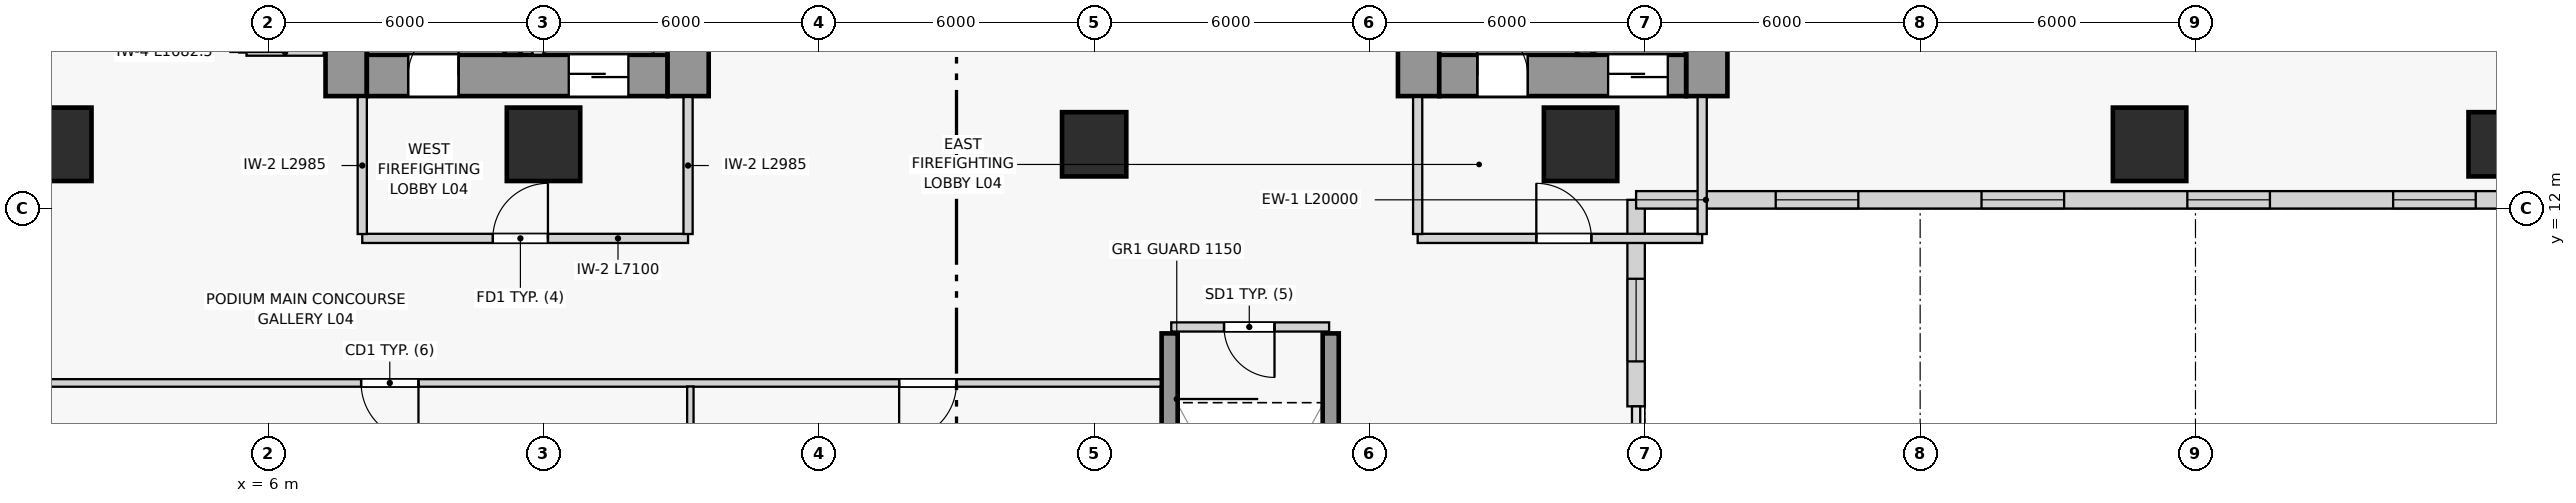
"""IFC4 building model, lengths in metres.
Left out: names, types, materials, properties, quantities, classifications, styles, units other than length and angle.
Written with IfcOpenShell. Run it as: python <this file> out.ifc"""

import sys

from ifc_helpers import new_model, si_unit, direction, frame, frame_2d, origin, origin_2d, place, context, subcontext, project, spatial, rectangle, extrude, source, transform, mapped, element, fill, save


model = new_model("IFC4")
c1 = context("Model", 3, precision=1e-05, world=origin(), true_north=direction((0.0, 1.0)))
c2 = subcontext(c1, "Body", "Model", "MODEL_VIEW")
j1 = project(units=[si_unit("LENGTHUNIT", "METRE"), si_unit("PLANEANGLEUNIT", "RADIAN")], contexts=[c1])
p1 = place(None, origin())
s1 = spatial("IfcSite", under=j1, at=p1, CompositionType="ELEMENT")
p2 = place(p1, origin())
s2 = spatial("IfcBuilding", under=s1, at=p2, CompositionType="ELEMENT")
p3 = place(p2, frame((0.0, 0.0, 18.0)))
s3 = spatial("IfcBuildingStorey", under=s2, at=p3, CompositionType="ELEMENT", Elevation=18.0)
p4 = place(p3, frame((7.7, 14.45, 0.0), z_axis=(0.0, 0.0, 1.0), x_axis=(0.0, 1.0, 0.0)))
e1 = element("IfcWall", 1, at=p4, inside=s3, PredefinedType="SHEAR", context=c2, shape_type="SweptSolid", body=[
    extrude(rectangle(XDim=13.15, YDim=0.9, at=frame_2d((6.575, 0.0))), origin(), (0.0, 0.0, 1.0), 4.5),
])
p5 = place(p3, frame((15.15, 14.45, 0.0), z_axis=(0.0, 0.0, 1.0), x_axis=(0.0, 1.0, 0.0)))
e2 = element("IfcWall", 2, at=p5, inside=s3, PredefinedType="SHEAR", context=c2, shape_type="SweptSolid", body=[
    extrude(rectangle(XDim=13.15, YDim=0.9, at=frame_2d((6.575, 0.0))), origin(), (0.0, 0.0, 1.0), 4.5),
])
p6 = place(p5, frame((5.65, 0.0, 0.0)))
e3 = element("IfcOpeningElement", 3, at=p6, cuts=e2, PredefinedType="OPENING", context=c2, shape_type="SweptSolid", body=[
    extrude(rectangle(XDim=1.1, YDim=2.2, at=frame_2d((0.55, 1.1))), frame((0.0, 0.46, 0.0), z_axis=(0.0, -1.0, 0.0), x_axis=(1.0, 0.0, 0.0)), (0.0, 0.0, 1.0), 0.92),
])
p7 = place(p3, frame((8.15, 14.9, 0.0), z_axis=(0.0, 0.0, 1.0), x_axis=(1.0, 0.0, 0.0)))
e4 = element("IfcWall", 4, at=p7, inside=s3, PredefinedType="SHEAR", context=c2, shape_type="SweptSolid", body=[
    extrude(rectangle(XDim=6.55, YDim=0.9, at=frame_2d((3.275, 0.0))), origin(), (0.0, 0.0, 1.0), 4.5),
])
p8 = place(p7, frame((0.9, 0.0, 0.0)))
e5 = element("IfcOpeningElement", 5, at=p8, cuts=e4, PredefinedType="OPENING", context=c2, shape_type="SweptSolid", body=[
    extrude(rectangle(XDim=1.1, YDim=2.2, at=frame_2d((0.55, 1.1))), frame((0.0, 0.46, 0.0), z_axis=(0.0, -1.0, 0.0), x_axis=(1.0, 0.0, 0.0)), (0.0, 0.0, 1.0), 0.92),
])
p9 = place(p7, frame((4.4, 0.0, 0.0)))
e6 = element("IfcOpeningElement", 6, at=p9, cuts=e4, PredefinedType="OPENING", context=c2, shape_type="SweptSolid", body=[
    extrude(rectangle(XDim=1.3, YDim=2.2, at=frame_2d((0.65, 1.1))), frame((0.0, 0.46, 0.0), z_axis=(0.0, -1.0, 0.0), x_axis=(1.0, 0.0, 0.0)), (0.0, 0.0, 1.0), 0.92),
])
p10 = place(p3, frame((31.07, 14.45, 0.0), z_axis=(0.0, 0.0, 1.0), x_axis=(0.0, 1.0, 0.0)))
e7 = element("IfcWall", 7, at=p10, inside=s3, PredefinedType="SHEAR", context=c2, shape_type="SweptSolid", body=[
    extrude(rectangle(XDim=13.15, YDim=0.9, at=frame_2d((6.575, 0.0))), origin(), (0.0, 0.0, 1.0), 4.5),
])
p11 = place(p3, frame((37.35, 14.45, 0.0), z_axis=(0.0, 0.0, 1.0), x_axis=(0.0, 1.0, 0.0)))
e8 = element("IfcWall", 8, at=p11, inside=s3, PredefinedType="SHEAR", context=c2, shape_type="SweptSolid", body=[
    extrude(rectangle(XDim=13.15, YDim=0.9, at=frame_2d((6.575, 0.0))), origin(), (0.0, 0.0, 1.0), 4.5),
])
p12 = place(p11, frame((5.65, 0.0, 0.0)))
e9 = element("IfcOpeningElement", 9, at=p12, cuts=e8, PredefinedType="OPENING", context=c2, shape_type="SweptSolid", body=[
    extrude(rectangle(XDim=1.1, YDim=2.2, at=frame_2d((0.55, 1.1))), frame((0.0, 0.46, 0.0), z_axis=(0.0, -1.0, 0.0), x_axis=(1.0, 0.0, 0.0)), (0.0, 0.0, 1.0), 0.92),
])
p13 = place(p3, frame((31.52, 14.9, 0.0), z_axis=(0.0, 0.0, 1.0), x_axis=(1.0, 0.0, 0.0)))
e10 = element("IfcWall", 10, at=p13, inside=s3, PredefinedType="SHEAR", context=c2, shape_type="SweptSolid", body=[
    extrude(rectangle(XDim=5.38, YDim=0.9, at=frame_2d((2.69, 0.0))), origin(), (0.0, 0.0, 1.0), 4.5),
])
p14 = place(p13, frame((0.83, 0.0, 0.0)))
e11 = element("IfcOpeningElement", 11, at=p14, cuts=e10, PredefinedType="OPENING", context=c2, shape_type="SweptSolid", body=[
    extrude(rectangle(XDim=1.1, YDim=2.2, at=frame_2d((0.55, 1.1))), frame((0.0, 0.46, 0.0), z_axis=(0.0, -1.0, 0.0), x_axis=(1.0, 0.0, 0.0)), (0.0, 0.0, 1.0), 0.92),
])
p15 = place(p13, frame((3.68, 0.0, 0.0)))
e12 = element("IfcOpeningElement", 12, at=p15, cuts=e10, PredefinedType="OPENING", context=c2, shape_type="SweptSolid", body=[
    extrude(rectangle(XDim=1.3, YDim=2.2, at=frame_2d((0.65, 1.1))), frame((0.0, 0.46, 0.0), z_axis=(0.0, -1.0, 0.0), x_axis=(1.0, 0.0, 0.0)), (0.0, 0.0, 1.0), 0.92),
])
for number, where, z_axis, x_axis in (
    (13, (11.325, 15.35, 0.0), (0.0, 0.0, 1.0), (0.0, 1.0, 0.0)),
    (14, (34.695, 15.35, 0.0), (0.0, 0.0, 1.0), (0.0, 1.0, 0.0)),
):
    element("IfcWall", number, at=place(p3, frame(where, z_axis=z_axis, x_axis=x_axis)), inside=s3, PredefinedType="SHEAR", context=c2, shape_type="SweptSolid", body=[
        extrude(rectangle(XDim=7.75, YDim=0.35, at=frame_2d((3.875, 0.0))), origin(), (0.0, 0.0, 1.0), 4.5),
    ])
for number, where, z_axis, x_axis in (
    (15, (25.645, 1.57, 0.0), (0.0, 0.0, 1.0), (0.0, 1.0, 0.0)),
    (16, (29.155, 1.57, 0.0), (0.0, 0.0, 1.0), (0.0, 1.0, 0.0)),
):
    element("IfcWall", number, at=place(p3, frame(where, z_axis=z_axis, x_axis=x_axis)), inside=s3, PredefinedType="SHEAR", context=c2, shape_type="SweptSolid", body=[
        extrude(rectangle(XDim=7.71, YDim=0.35, at=frame_2d((3.855, 0.0))), origin(), (0.0, 0.0, 1.0), 4.5),
    ])
m1 = source(origin(), c2, "Body", "SweptSolid", [
    extrude(rectangle(XDim=1.6, YDim=1.6, at=origin_2d()), origin(), (0.0, 0.0, 1.0), 4.5),
])
for number, where, z_axis, x_axis in (
    (17, (1.35, 13.4, 0.0), (0.0, 0.0, 1.0), (1.0, 0.0, 0.0)),
    (18, (12.0, 13.4, 0.0), (0.0, 0.0, 1.0), (1.0, 0.0, 0.0)),
):
    element("IfcColumn", number, at=place(p3, frame(where, z_axis=z_axis, x_axis=x_axis)), inside=s3, PredefinedType="COLUMN", context=c2, shape_type="MappedRepresentation", body=[
        mapped(m1, transform((0.0, 0.0, 0.0), scale=1.0)),
    ])
m2 = source(origin(), c2, "Body", "SweptSolid", [
    extrude(rectangle(XDim=1.4, YDim=1.4, at=origin_2d()), origin(), (0.0, 0.0, 1.0), 4.5),
])
p16 = place(p3, frame((24.0, 13.4, 0.0), z_axis=(0.0, 0.0, 1.0), x_axis=(1.0, 0.0, 0.0)))
e19 = element("IfcColumn", 19, at=p16, inside=s3, PredefinedType="COLUMN", context=c2, shape_type="MappedRepresentation", body=[
    mapped(m2, transform((0.0, 0.0, 0.0), scale=1.0)),
])
for number, where, z_axis, x_axis in (
    (20, (34.6, 13.4, 0.0), (0.0, 0.0, 1.0), (1.0, 0.0, 0.0)),
    (21, (47.0, 13.4, 0.0), (0.0, 0.0, 1.0), (1.0, 0.0, 0.0)),
):
    element("IfcColumn", number, at=place(p3, frame(where, z_axis=z_axis, x_axis=x_axis)), inside=s3, PredefinedType="COLUMN", context=c2, shape_type="MappedRepresentation", body=[
        mapped(m1, transform((0.0, 0.0, 0.0), scale=1.0)),
    ])
p17 = place(p3, frame((54.65, 13.4, 0.0), z_axis=(0.0, 0.0, 1.0), x_axis=(1.0, 0.0, 0.0)))
e22 = element("IfcColumn", 22, at=p17, inside=s3, PredefinedType="COLUMN", context=c2, shape_type="MappedRepresentation", body=[
    mapped(m2, transform((0.0, 0.0, 0.0), scale=1.0)),
])
p18 = place(p3, frame((35.81, 7.69, 0.0), z_axis=(0.0, 0.0, 1.0), x_axis=(0.0, 1.0, 0.0)))
e23 = element("IfcWall", 23, at=p18, inside=s3, PredefinedType="SOLIDWALL", context=c2, shape_type="SweptSolid", body=[
    extrude(rectangle(XDim=4.5, YDim=0.38, at=frame_2d((2.25, 0.0))), origin(), (0.0, 0.0, 1.0), 3.85),
])
p19 = place(p18, frame((0.98, 0.0, 0.8)))
e24 = element("IfcOpeningElement", 24, at=p19, cuts=e23, PredefinedType="OPENING", context=c2, shape_type="SweptSolid", body=[
    extrude(rectangle(XDim=1.8, YDim=2.1, at=frame_2d((0.9, 1.05))), frame((0.0, 0.2, 0.0), z_axis=(0.0, -1.0, 0.0), x_axis=(1.0, 0.0, 0.0)), (0.0, 0.0, 1.0), 0.4),
])
p20 = place(p3, frame((35.81, 12.19, 0.0), z_axis=(0.0, 0.0, 1.0), x_axis=(1.0, 0.0, 0.0)))
e25 = element("IfcWall", 25, at=p20, inside=s3, PredefinedType="SOLIDWALL", context=c2, shape_type="SweptSolid", body=[
    extrude(rectangle(XDim=20.0, YDim=0.38, at=frame_2d((10.0, 0.0))), origin(), (0.0, 0.0, 1.0), 3.85),
])
p21 = place(p20, frame((3.042, 0.0, 0.8)))
e26 = element("IfcOpeningElement", 26, at=p21, cuts=e25, PredefinedType="OPENING", context=c2, shape_type="SweptSolid", body=[
    extrude(rectangle(XDim=1.8, YDim=2.1, at=frame_2d((0.9, 1.05))), frame((0.0, 0.2, 0.0), z_axis=(0.0, -1.0, 0.0), x_axis=(1.0, 0.0, 0.0)), (0.0, 0.0, 1.0), 0.4),
])
p22 = place(p20, frame((7.528, 0.0, 0.8)))
e27 = element("IfcOpeningElement", 27, at=p22, cuts=e25, PredefinedType="OPENING", context=c2, shape_type="SweptSolid", body=[
    extrude(rectangle(XDim=1.8, YDim=2.1, at=frame_2d((0.9, 1.05))), frame((0.0, 0.2, 0.0), z_axis=(0.0, -1.0, 0.0), x_axis=(1.0, 0.0, 0.0)), (0.0, 0.0, 1.0), 0.4),
])
p23 = place(p20, frame((12.012, 0.0, 0.8)))
e28 = element("IfcOpeningElement", 28, at=p23, cuts=e25, PredefinedType="OPENING", context=c2, shape_type="SweptSolid", body=[
    extrude(rectangle(XDim=1.8, YDim=2.1, at=frame_2d((0.9, 1.05))), frame((0.0, 0.2, 0.0), z_axis=(0.0, -1.0, 0.0), x_axis=(1.0, 0.0, 0.0)), (0.0, 0.0, 1.0), 0.4),
])
p24 = place(p20, frame((16.498, 0.0, 0.8)))
e29 = element("IfcOpeningElement", 29, at=p24, cuts=e25, PredefinedType="OPENING", context=c2, shape_type="SweptSolid", body=[
    extrude(rectangle(XDim=1.8, YDim=2.1, at=frame_2d((0.9, 1.05))), frame((0.0, 0.2, 0.0), z_axis=(0.0, -1.0, 0.0), x_axis=(1.0, 0.0, 0.0)), (0.0, 0.0, 1.0), 0.4),
])
p25 = place(p3, frame((11.88, 15.35, 0.0), z_axis=(0.0, 0.0, 1.0), x_axis=(0.0, 1.0, 0.0)))
e30 = element("IfcWall", 30, at=p25, inside=s3, PredefinedType="PARTITIONING", context=c2, shape_type="SweptSolid", body=[
    extrude(rectangle(XDim=2.85, YDim=0.24, at=frame_2d((1.425, 0.0))), origin(), (0.0, 0.0, 1.0), 3.85),
])
p26 = place(p3, frame((8.05, 11.35, 0.0), z_axis=(0.0, 0.0, 1.0), x_axis=(1.0, 0.0, 0.0)))
e31 = element("IfcWall", 31, at=p26, inside=s3, PredefinedType="PARTITIONING", context=c2, shape_type="SweptSolid", body=[
    extrude(rectangle(XDim=7.1, YDim=0.2, at=frame_2d((3.55, 0.0))), origin(), (0.0, 0.0, 1.0), 3.85),
])
p27 = place(p26, frame((2.846, 0.0, 0.0)))
e32 = element("IfcOpeningElement", 32, at=p27, cuts=e31, PredefinedType="OPENING", context=c2, shape_type="SweptSolid", body=[
    extrude(rectangle(XDim=1.2, YDim=2.2, at=frame_2d((0.6, 1.1))), frame((0.0, 0.11, 0.0), z_axis=(0.0, -1.0, 0.0), x_axis=(1.0, 0.0, 0.0)), (0.0, 0.0, 1.0), 0.22),
])
for number, where, z_axis, x_axis in (
    (33, (8.05, 11.445, 0.0), (0.0, 0.0, 1.0), (0.0, 1.0, 0.0)),
    (34, (15.15, 11.445, 0.0), (0.0, 0.0, 1.0), (0.0, 1.0, 0.0)),
):
    element("IfcWall", number, at=place(p3, frame(where, z_axis=z_axis, x_axis=x_axis)), inside=s3, PredefinedType="PARTITIONING", context=c2, shape_type="SweptSolid", body=[
        extrude(rectangle(XDim=2.985, YDim=0.2, at=frame_2d((1.492, 0.0))), origin(), (0.0, 0.0, 1.0), 3.85),
    ])
p28 = place(p3, frame((31.05, 11.35, 0.0), z_axis=(0.0, 0.0, 1.0), x_axis=(1.0, 0.0, 0.0)))
e35 = element("IfcWall", 35, at=p28, inside=s3, PredefinedType="PARTITIONING", context=c2, shape_type="SweptSolid", body=[
    extrude(rectangle(XDim=6.2, YDim=0.2, at=frame_2d((3.1, 0.0))), origin(), (0.0, 0.0, 1.0), 3.85),
])
p29 = place(p28, frame((2.586, 0.0, 0.0)))
e36 = element("IfcOpeningElement", 36, at=p29, cuts=e35, PredefinedType="OPENING", context=c2, shape_type="SweptSolid", body=[
    extrude(rectangle(XDim=1.2, YDim=2.2, at=frame_2d((0.6, 1.1))), frame((0.0, 0.11, 0.0), z_axis=(0.0, -1.0, 0.0), x_axis=(1.0, 0.0, 0.0)), (0.0, 0.0, 1.0), 0.22),
])
p30 = place(p3, frame((31.05, 11.445, 0.0), z_axis=(0.0, 0.0, 1.0), x_axis=(0.0, 1.0, 0.0)))
e37 = element("IfcWall", 37, at=p30, inside=s3, PredefinedType="PARTITIONING", context=c2, shape_type="SweptSolid", body=[
    extrude(rectangle(XDim=2.985, YDim=0.2, at=frame_2d((1.492, 0.0))), origin(), (0.0, 0.0, 1.0), 2.72),
])
p31 = place(p3, frame((37.25, 11.445, 0.0), z_axis=(0.0, 0.0, 1.0), x_axis=(0.0, 1.0, 0.0)))
e38 = element("IfcWall", 38, at=p31, inside=s3, PredefinedType="PARTITIONING", context=c2, shape_type="SweptSolid", body=[
    extrude(rectangle(XDim=2.985, YDim=0.2, at=frame_2d((1.492, 0.0))), origin(), (0.0, 0.0, 1.0), 3.85),
])
p32 = place(p3, frame((5.45, 15.4, 0.0), z_axis=(0.0, 0.0, 1.0), x_axis=(0.0, 1.0, 0.0)))
e39 = element("IfcWall", 39, at=p32, inside=s3, PredefinedType="PARTITIONING", context=c2, shape_type="SweptSolid", body=[
    extrude(rectangle(XDim=10.8, YDim=0.165, at=frame_2d((5.4, 0.0))), origin(), (0.0, 0.0, 1.0), 3.85),
])
p33 = place(p32, frame((4.95, 0.0, 0.0)))
e40 = element("IfcOpeningElement", 40, at=p33, cuts=e39, PredefinedType="OPENING", context=c2, shape_type="SweptSolid", body=[
    extrude(rectangle(XDim=0.9, YDim=2.1, at=frame_2d((0.45, 1.05))), frame((0.0, 0.093, 0.0), z_axis=(0.0, -1.0, 0.0), x_axis=(1.0, 0.0, 0.0)), (0.0, 0.0, 1.0), 0.185),
])
p34 = place(p3, frame((5.528, 15.4, 0.0), z_axis=(0.0, 0.0, 1.0), x_axis=(1.0, 0.0, 0.0)))
e41 = element("IfcWall", 41, at=p34, inside=s3, PredefinedType="PARTITIONING", context=c2, shape_type="SweptSolid", body=[
    extrude(rectangle(XDim=1.682, YDim=0.14, at=frame_2d((0.841, 0.0))), origin(), (0.0, 0.0, 1.0), 3.85),
])
p35 = place(p3, frame((25.68, 9.42, 0.0), z_axis=(0.0, 0.0, 1.0), x_axis=(1.0, 0.0, 0.0)))
e42 = element("IfcWall", 42, at=p35, inside=s3, PredefinedType="PARTITIONING", context=c2, shape_type="SweptSolid", body=[
    extrude(rectangle(XDim=3.44, YDim=0.2, at=frame_2d((1.72, 0.0))), origin(), (0.0, 0.0, 1.0), 3.85),
])
p36 = place(p35, frame((1.15, 0.0, 0.0)))
e43 = element("IfcOpeningElement", 43, at=p36, cuts=e42, PredefinedType="OPENING", context=c2, shape_type="SweptSolid", body=[
    extrude(rectangle(XDim=1.1, YDim=2.2, at=frame_2d((0.55, 1.1))), frame((0.0, 0.11, 0.0), z_axis=(0.0, -1.0, 0.0), x_axis=(1.0, 0.0, 0.0)), (0.0, 0.0, 1.0), 0.22),
])
p37 = place(p3, frame((0.185, 8.2, 0.0), z_axis=(0.0, 0.0, 1.0), x_axis=(1.0, 0.0, 0.0)))
e44 = element("IfcWall", 44, at=p37, inside=s3, PredefinedType="PARTITIONING", context=c2, shape_type="SweptSolid", body=[
    extrude(rectangle(XDim=25.265, YDim=0.165, at=frame_2d((12.632, 0.0))), origin(), (0.0, 0.0, 1.0), 3.85),
])
p38 = place(p37, frame((7.84, 0.0, 0.0)))
e45 = element("IfcOpeningElement", 45, at=p38, cuts=e44, PredefinedType="OPENING", context=c2, shape_type="SweptSolid", body=[
    extrude(rectangle(XDim=1.25, YDim=2.2, at=frame_2d((0.625, 1.1))), frame((0.0, 0.093, 0.0), z_axis=(0.0, -1.0, 0.0), x_axis=(1.0, 0.0, 0.0)), (0.0, 0.0, 1.0), 0.185),
])
p39 = place(p37, frame((19.565, 0.0, 0.0)))
e46 = element("IfcOpeningElement", 46, at=p39, cuts=e44, PredefinedType="OPENING", context=c2, shape_type="SweptSolid", body=[
    extrude(rectangle(XDim=1.25, YDim=2.2, at=frame_2d((0.625, 1.1))), frame((0.0, 0.093, 0.0), z_axis=(0.0, -1.0, 0.0), x_axis=(1.0, 0.0, 0.0)), (0.0, 0.0, 1.0), 0.185),
])
p40 = place(p3, frame((15.2, -5.815, 0.0), z_axis=(0.0, 0.0, 1.0), x_axis=(0.0, 1.0, 0.0)))
e47 = element("IfcWall", 47, at=p40, inside=s3, PredefinedType="PARTITIONING", context=c2, shape_type="SweptSolid", body=[
    extrude(rectangle(XDim=13.938, YDim=0.14, at=frame_2d((6.969, 0.0))), origin(), (0.0, 0.0, 1.0), 3.85),
])
m3 = source(origin(), c2, "Body", "SweptSolid", [
    extrude(rectangle(XDim=1.8, YDim=2.1, at=frame_2d((0.9, 1.05))), frame((0.0, 0.03, 0.0), z_axis=(0.0, -1.0, 0.0), x_axis=(1.0, 0.0, 0.0)), (0.0, 0.0, 1.0), 0.06),
])
p41 = place(p19, origin())
e48 = element("IfcWindow", 48, at=p41, inside=s3, PartitioningType="SINGLE_PANEL", PredefinedType="WINDOW", context=c2, shape_type="MappedRepresentation", body=[
    mapped(m3, transform((0.0, 0.0, 0.0), scale=1.0)),
])
fill(e24, e48)
p42 = place(p21, origin())
e49 = element("IfcWindow", 49, at=p42, inside=s3, PartitioningType="SINGLE_PANEL", PredefinedType="WINDOW", context=c2, shape_type="MappedRepresentation", body=[
    mapped(m3, transform((0.0, 0.0, 0.0), scale=1.0)),
])
fill(e26, e49)
p43 = place(p22, origin())
e50 = element("IfcWindow", 50, at=p43, inside=s3, PartitioningType="SINGLE_PANEL", PredefinedType="WINDOW", context=c2, shape_type="MappedRepresentation", body=[
    mapped(m3, transform((0.0, 0.0, 0.0), scale=1.0)),
])
fill(e27, e50)
p44 = place(p23, origin())
e51 = element("IfcWindow", 51, at=p44, inside=s3, PartitioningType="SINGLE_PANEL", PredefinedType="WINDOW", context=c2, shape_type="MappedRepresentation", body=[
    mapped(m3, transform((0.0, 0.0, 0.0), scale=1.0)),
])
fill(e28, e51)
p45 = place(p24, origin())
e52 = element("IfcWindow", 52, at=p45, inside=s3, PartitioningType="SINGLE_PANEL", PredefinedType="WINDOW", context=c2, shape_type="MappedRepresentation", body=[
    mapped(m3, transform((0.0, 0.0, 0.0), scale=1.0)),
])
fill(e29, e52)
m4 = source(origin(), c2, "Body", "SweptSolid", [
    extrude(rectangle(XDim=1.1, YDim=2.2, at=frame_2d((0.55, 1.1))), frame((0.0, 0.025, 0.0), z_axis=(0.0, -1.0, 0.0), x_axis=(1.0, 0.0, 0.0)), (0.0, 0.0, 1.0), 0.05),
])
p46 = place(p8, origin())
e53 = element("IfcDoor", 53, at=p46, inside=s3, OperationType="SINGLE_SWING_RIGHT", PredefinedType="DOOR", context=c2, shape_type="MappedRepresentation", body=[
    mapped(m4, transform((0.0, 0.0, 0.0), scale=1.0)),
])
fill(e5, e53)
p47 = place(p14, origin())
e54 = element("IfcDoor", 54, at=p47, inside=s3, OperationType="SINGLE_SWING_LEFT", PredefinedType="DOOR", context=c2, shape_type="MappedRepresentation", body=[
    mapped(m4, transform((0.0, 0.0, 0.0), scale=1.0)),
])
fill(e11, e54)
m5 = source(origin(), c2, "Body", "SweptSolid", [
    extrude(rectangle(XDim=1.3, YDim=2.2, at=frame_2d((0.65, 1.1))), frame((0.0, 0.025, 0.0), z_axis=(0.0, -1.0, 0.0), x_axis=(1.0, 0.0, 0.0)), (0.0, 0.0, 1.0), 0.05),
])
p48 = place(p9, origin())
e55 = element("IfcDoor", 55, at=p48, inside=s3, OperationType="SLIDING_TO_RIGHT", PredefinedType="DOOR", context=c2, shape_type="MappedRepresentation", body=[
    mapped(m5, transform((0.0, 0.0, 0.0), scale=1.0)),
])
fill(e6, e55)
p49 = place(p15, origin())
e56 = element("IfcDoor", 56, at=p49, inside=s3, OperationType="SLIDING_TO_RIGHT", PredefinedType="DOOR", context=c2, shape_type="MappedRepresentation", body=[
    mapped(m5, transform((0.0, 0.0, 0.0), scale=1.0)),
])
fill(e12, e56)
m6 = source(origin(), c2, "Body", "SweptSolid", [
    extrude(rectangle(XDim=1.2, YDim=2.2, at=frame_2d((0.6, 1.1))), frame((0.0, 0.025, 0.0), z_axis=(0.0, -1.0, 0.0), x_axis=(1.0, 0.0, 0.0)), (0.0, 0.0, 1.0), 0.05),
])
p50 = place(p27, origin())
e57 = element("IfcDoor", 57, at=p50, inside=s3, OperationType="SINGLE_SWING_RIGHT", PredefinedType="DOOR", context=c2, shape_type="MappedRepresentation", body=[
    mapped(m6, transform((0.0, 0.0, 0.0), scale=1.0)),
])
fill(e32, e57)
p51 = place(p29, origin())
e58 = element("IfcDoor", 58, at=p51, inside=s3, OperationType="SINGLE_SWING_LEFT", PredefinedType="DOOR", context=c2, shape_type="MappedRepresentation", body=[
    mapped(m6, transform((0.0, 0.0, 0.0), scale=1.0)),
])
fill(e36, e58)
p52 = place(p36, frame((1.1, 0.0, 0.0), z_axis=(0.0, 0.0, 1.0), x_axis=(-1.0, 0.0, 0.0)))
e59 = element("IfcDoor", 59, at=p52, inside=s3, OperationType="SINGLE_SWING_LEFT", PredefinedType="DOOR", context=c2, shape_type="MappedRepresentation", body=[
    mapped(m4, transform((0.0, 0.0, 0.0), scale=1.0)),
])
fill(e43, e59)
m7 = source(origin(), c2, "Body", "SweptSolid", [
    extrude(rectangle(XDim=1.25, YDim=2.2, at=frame_2d((0.625, 1.1))), frame((0.0, 0.025, 0.0), z_axis=(0.0, -1.0, 0.0), x_axis=(1.0, 0.0, 0.0)), (0.0, 0.0, 1.0), 0.05),
])
p53 = place(p38, frame((1.25, 0.0, 0.0), z_axis=(0.0, 0.0, 1.0), x_axis=(-1.0, 0.0, 0.0)))
e60 = element("IfcDoor", 60, at=p53, inside=s3, OperationType="SINGLE_SWING_LEFT", PredefinedType="DOOR", context=c2, shape_type="MappedRepresentation", body=[
    mapped(m7, transform((0.0, 0.0, 0.0), scale=1.0)),
])
fill(e45, e60)
p54 = place(p39, frame((1.25, 0.0, 0.0), z_axis=(0.0, 0.0, 1.0), x_axis=(-1.0, 0.0, 0.0)))
e61 = element("IfcDoor", 61, at=p54, inside=s3, OperationType="SINGLE_SWING_RIGHT", PredefinedType="DOOR", context=c2, shape_type="MappedRepresentation", body=[
    mapped(m7, transform((0.0, 0.0, 0.0), scale=1.0)),
])
fill(e46, e61)
save(model, sys.argv[1])
